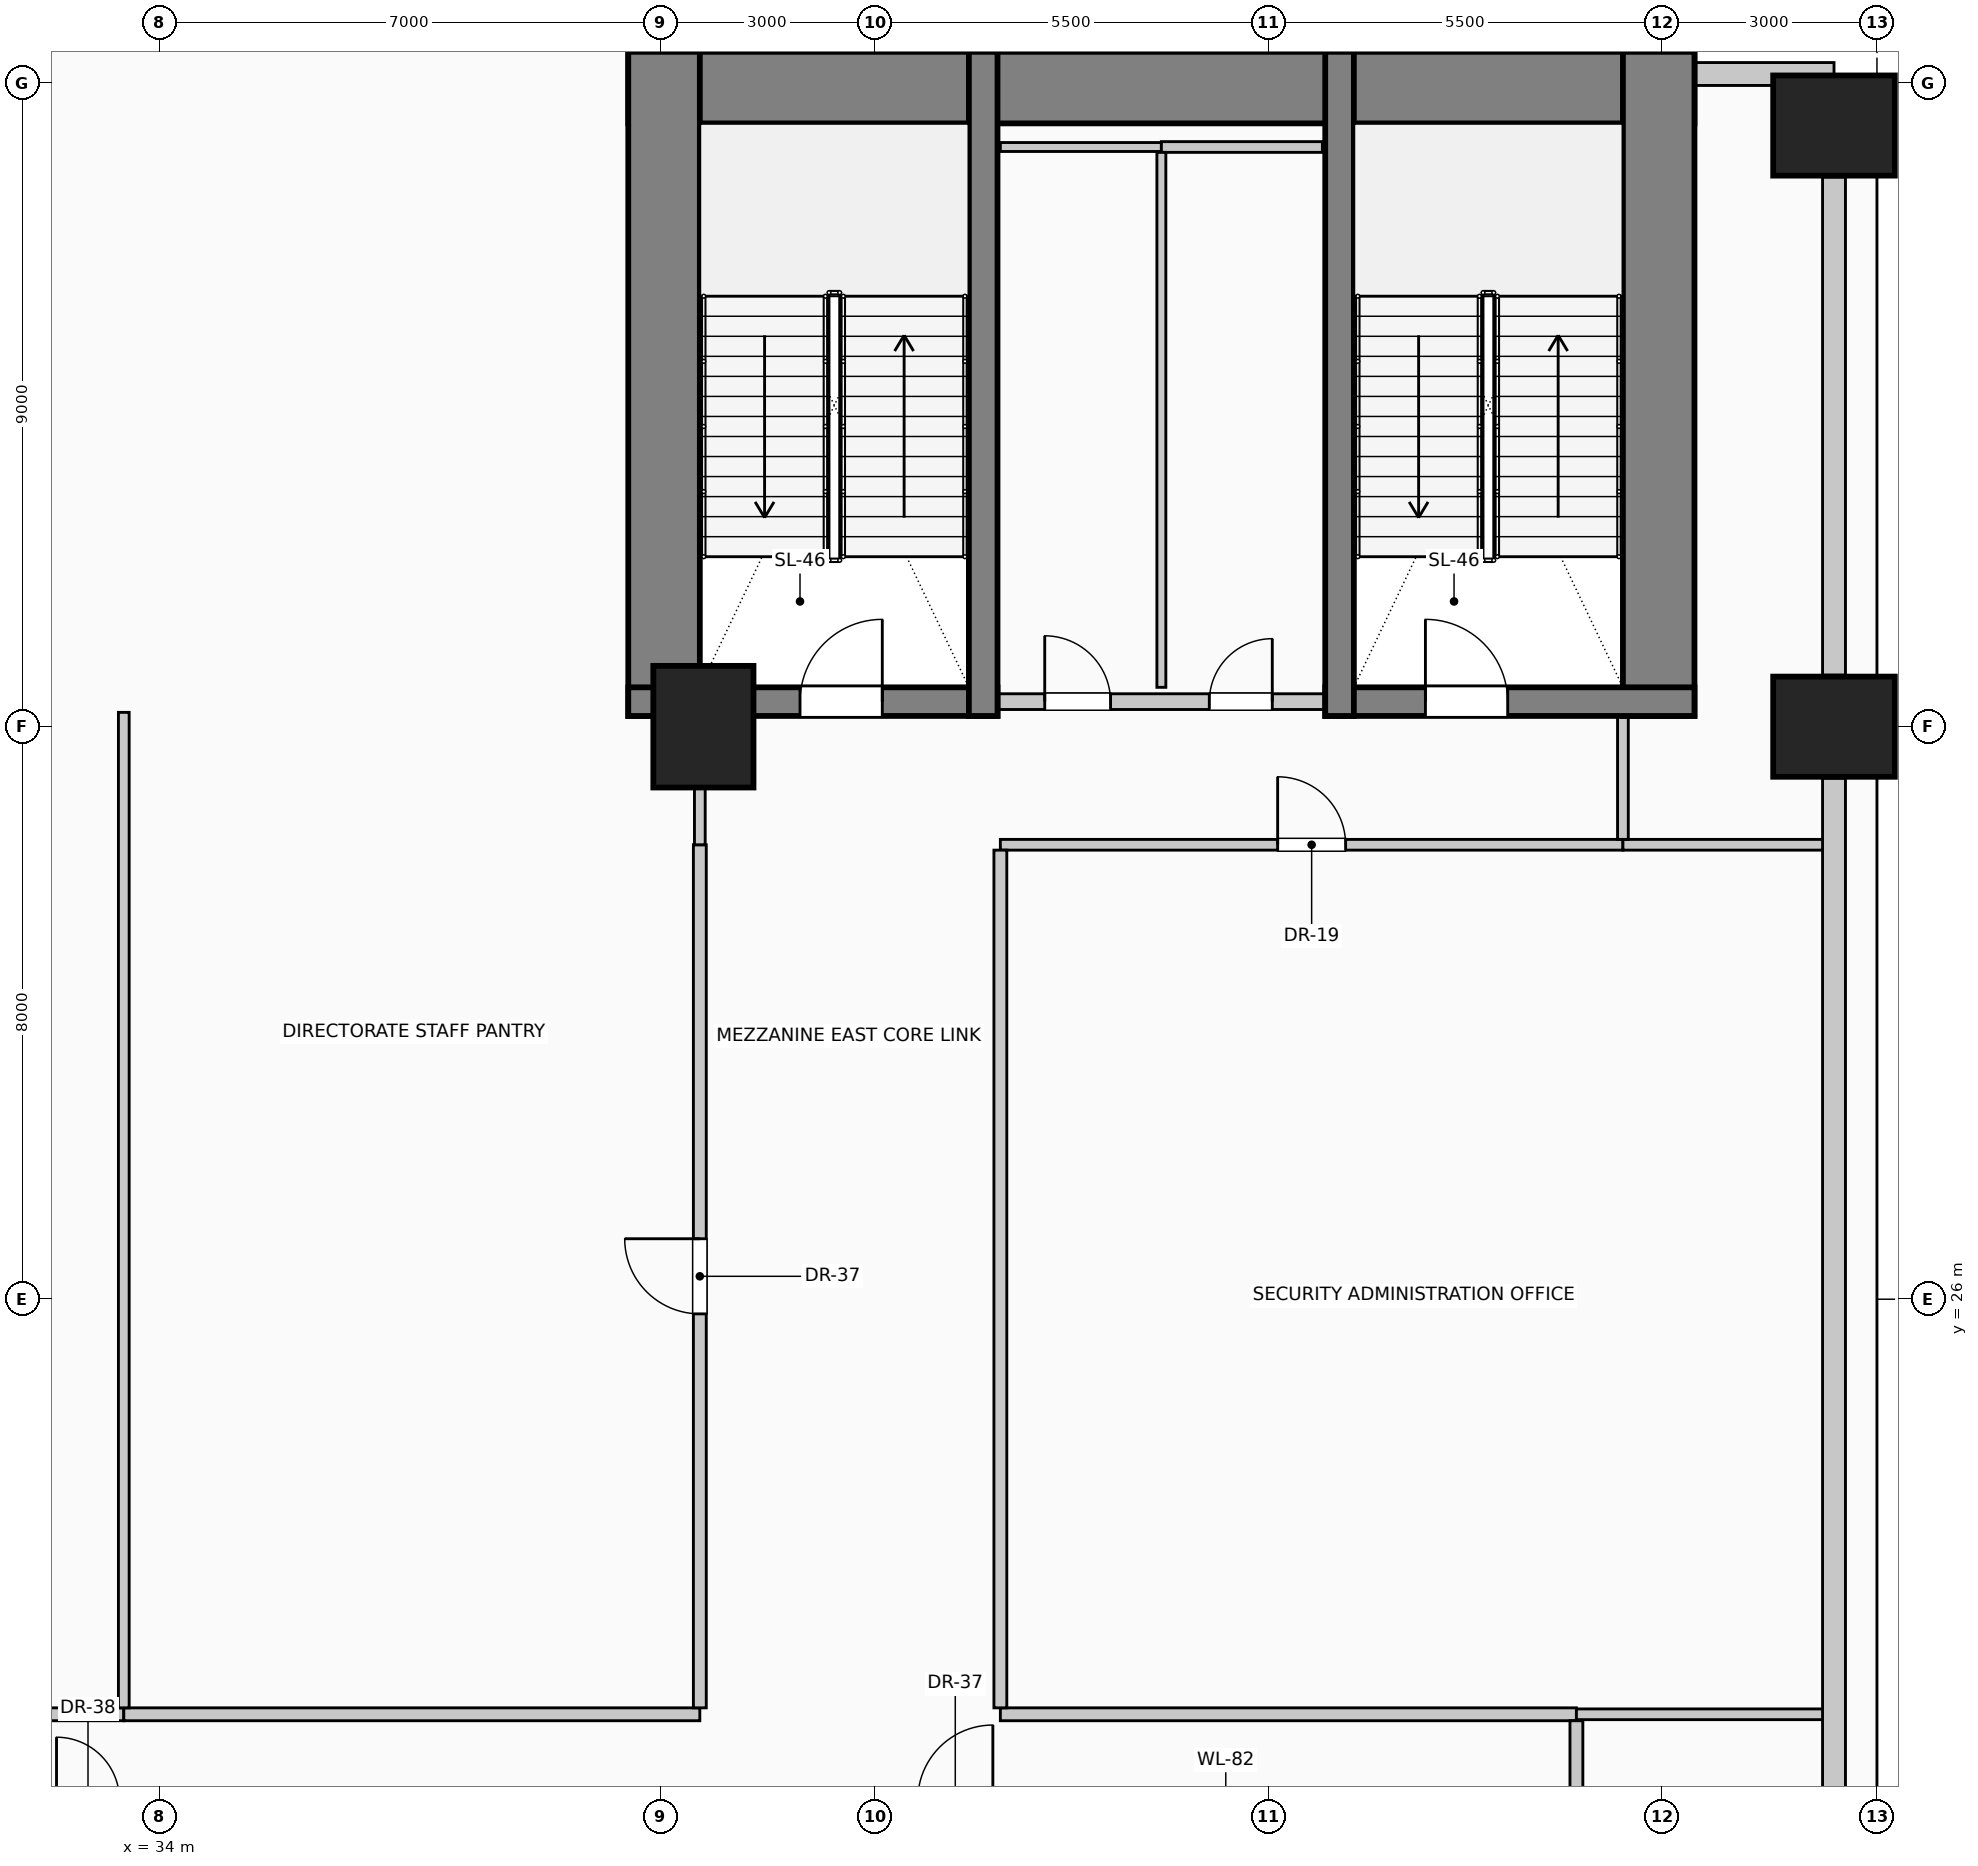
"""IFC4 building model, lengths in metres.
Left out: names, types, materials, properties, quantities, classifications, styles, units other than length and angle.
Written with IfcOpenShell. Run it as: python <this file> out.ifc"""

import sys

from ifc_helpers import new_model, si_unit, direction, frame, frame_2d, origin, origin_2d, place, context, subcontext, project, spatial, rectangle, extrude, element, fill, save


model = new_model("IFC4")
c1 = context("Model", 3, precision=1e-05, world=origin(), true_north=direction((0.0, 1.0)))
c2 = subcontext(c1, "Body", "Model", "MODEL_VIEW")
j1 = project(units=[si_unit("LENGTHUNIT", "METRE"), si_unit("PLANEANGLEUNIT", "RADIAN")], contexts=[c1])
p1 = place(None, origin())
s1 = spatial("IfcSite", under=j1, at=p1, CompositionType="ELEMENT")
p2 = place(p1, origin())
s2 = spatial("IfcBuilding", under=s1, at=p2, CompositionType="ELEMENT")
p3 = place(p2, frame((0.0, 0.0, 17.55)))
s3 = spatial("IfcBuildingStorey", under=s2, at=p3, CompositionType="ELEMENT", Elevation=17.55)
p4 = place(p3, frame((40.55, 42.93, 0.0), z_axis=(0.0, 0.0, 1.0), x_axis=(1.0, 0.0, 0.0)))
e1 = element("IfcWall", 1, at=p4, inside=s3, PredefinedType="SHEAR", context=c2, shape_type="SweptSolid", body=[
    extrude(rectangle(XDim=14.9, YDim=1.0, at=frame_2d((7.45, 0.0))), origin(), (0.0, 0.0, 1.0), 5.05),
])
for number, where, z_axis, x_axis in (
    (2, (41.05, 34.15, 0.0), (0.0, 0.0, 1.0), (0.0, 1.0, 0.0)),
    (3, (54.95, 34.15, 0.0), (0.0, 0.0, 1.0), (0.0, 1.0, 0.0)),
):
    element("IfcWall", number, at=place(p3, frame(where, z_axis=z_axis, x_axis=x_axis)), inside=s3, PredefinedType="SHEAR", context=c2, shape_type="SweptSolid", body=[
        extrude(rectangle(XDim=9.28, YDim=1.0, at=frame_2d((4.64, 0.0))), origin(), (0.0, 0.0, 1.0), 5.05),
    ])
p5 = place(p3, frame((40.55, 34.35, 0.0), z_axis=(0.0, 0.0, 1.0), x_axis=(1.0, 0.0, 0.0)))
e4 = element("IfcWall", 4, at=p5, inside=s3, PredefinedType="SHEAR", context=c2, shape_type="SweptSolid", body=[
    extrude(rectangle(XDim=5.16, YDim=0.4, at=frame_2d((2.58, 0.0))), origin(), (0.0, 0.0, 1.0), 5.05),
])
p6 = place(p5, frame((2.4, 0.0, 0.0)))
e5 = element("IfcOpeningElement", 5, at=p6, cuts=e4, PredefinedType="OPENING", context=c2, shape_type="SweptSolid", body=[
    extrude(rectangle(XDim=1.15, YDim=2.2, at=frame_2d((0.575, 1.1))), frame((0.0, 0.21, 0.0), z_axis=(0.0, -1.0, 0.0), x_axis=(1.0, 0.0, 0.0)), (0.0, 0.0, 1.0), 0.42),
])
p7 = place(p3, frame((45.51, 34.15, 0.0), z_axis=(0.0, 0.0, 1.0), x_axis=(0.0, 1.0, 0.0)))
e6 = element("IfcWall", 6, at=p7, inside=s3, PredefinedType="SHEAR", context=c2, shape_type="SweptSolid", body=[
    extrude(rectangle(XDim=9.28, YDim=0.4, at=frame_2d((4.64, 0.0))), origin(), (0.0, 0.0, 1.0), 5.05),
])
p8 = place(p3, frame((50.29, 34.35, 0.0), z_axis=(0.0, 0.0, 1.0), x_axis=(1.0, 0.0, 0.0)))
e7 = element("IfcWall", 7, at=p8, inside=s3, PredefinedType="SHEAR", context=c2, shape_type="SweptSolid", body=[
    extrude(rectangle(XDim=5.16, YDim=0.4, at=frame_2d((2.58, 0.0))), origin(), (0.0, 0.0, 1.0), 5.05),
])
p9 = place(p8, frame((1.4, 0.0, 0.0)))
e8 = element("IfcOpeningElement", 8, at=p9, cuts=e7, PredefinedType="OPENING", context=c2, shape_type="SweptSolid", body=[
    extrude(rectangle(XDim=1.15, YDim=2.2, at=frame_2d((0.575, 1.1))), frame((0.0, 0.21, 0.0), z_axis=(0.0, -1.0, 0.0), x_axis=(1.0, 0.0, 0.0)), (0.0, 0.0, 1.0), 0.42),
])
p10 = place(p3, frame((50.49, 34.15, 0.0), z_axis=(0.0, 0.0, 1.0), x_axis=(0.0, 1.0, 0.0)))
e9 = element("IfcWall", 9, at=p10, inside=s3, PredefinedType="SHEAR", context=c2, shape_type="SweptSolid", body=[
    extrude(rectangle(XDim=9.28, YDim=0.4, at=frame_2d((4.64, 0.0))), origin(), (0.0, 0.0, 1.0), 5.05),
])
for number, where, z_axis, x_axis in (
    (10, (57.4, 34.0, 0.0), (0.0, 0.0, 1.0), (0.0, 1.0, 0.0)),
    (11, (57.4, 42.4, 0.0), (0.0, 0.0, 1.0), (0.0, 1.0, 0.0)),
    (12, (41.6, 34.0, 0.0), (0.0, 0.0, 1.0), (1.0, 0.0, 0.0)),
):
    element("IfcColumn", number, at=place(p3, frame(where, z_axis=z_axis, x_axis=x_axis)), inside=s3, PredefinedType="COLUMN", context=c2, shape_type="SweptSolid", body=[
        extrude(rectangle(XDim=1.4, YDim=1.7, at=origin_2d()), origin(), (0.0, 0.0, 1.0), 5.05),
    ])
p11 = place(p3, frame((57.4, 33.28, 0.0), z_axis=(0.0, 0.0, 1.0), x_axis=(0.0, -1.0, 0.0)))
e13 = element("IfcWall", 13, at=p11, inside=s3, PredefinedType="SOLIDWALL", context=c2, shape_type="SweptSolid", body=[
    extrude(rectangle(XDim=14.56, YDim=0.32, at=frame_2d((7.28, 0.0))), origin(), (0.0, 0.0, 1.0), 3.15),
])
p12 = place(p3, frame((57.4, 41.68, 0.0), z_axis=(0.0, 0.0, 1.0), x_axis=(0.0, -1.0, 0.0)))
e14 = element("IfcWall", 14, at=p12, inside=s3, PredefinedType="SOLIDWALL", context=c2, shape_type="SweptSolid", body=[
    extrude(rectangle(XDim=6.96, YDim=0.32, at=frame_2d((3.48, 0.0))), origin(), (0.0, 0.0, 1.0), 3.15),
])
p13 = place(p3, frame((55.455, 43.12, 0.0), z_axis=(0.0, 0.0, 1.0), x_axis=(1.0, 0.0, 0.0)))
e15 = element("IfcWall", 15, at=p13, inside=s3, PredefinedType="SOLIDWALL", context=c2, shape_type="SweptSolid", body=[
    extrude(rectangle(XDim=1.945, YDim=0.32, at=frame_2d((0.972, 0.0))), origin(), (0.0, 0.0, 1.0), 4.75),
])
p14 = place(p3, frame((45.72, 34.35, 0.0), z_axis=(0.0, 0.0, 1.0), x_axis=(1.0, 0.0, 0.0)))
e16 = element("IfcWall", 16, at=p14, inside=s3, PredefinedType="PARTITIONING", context=c2, shape_type="SweptSolid", body=[
    extrude(rectangle(XDim=4.56, YDim=0.22, at=frame_2d((2.28, 0.0))), origin(), (0.0, 0.0, 1.0), 3.145),
])
p15 = place(p14, frame((0.65, 0.0, 0.0)))
e17 = element("IfcOpeningElement", 17, at=p15, cuts=e16, PredefinedType="OPENING", context=c2, shape_type="SweptSolid", body=[
    extrude(rectangle(XDim=0.92, YDim=2.1, at=frame_2d((0.46, 1.05))), frame((0.0, 0.12, 0.0), z_axis=(0.0, -1.0, 0.0), x_axis=(1.0, 0.0, 0.0)), (0.0, 0.0, 1.0), 0.24),
])
p16 = place(p14, frame((2.95, 0.0, 0.0)))
e18 = element("IfcOpeningElement", 18, at=p16, cuts=e16, PredefinedType="OPENING", context=c2, shape_type="SweptSolid", body=[
    extrude(rectangle(XDim=0.88, YDim=2.1, at=frame_2d((0.44, 1.05))), frame((0.0, 0.12, 0.0), z_axis=(0.0, -1.0, 0.0), x_axis=(1.0, 0.0, 0.0)), (0.0, 0.0, 1.0), 0.24),
])
p17 = place(p3, frame((15.85, 20.2, 0.0), z_axis=(0.0, 0.0, 1.0), x_axis=(1.0, 0.0, 0.0)))
e19 = element("IfcWall", 19, at=p17, inside=s3, PredefinedType="PARTITIONING", context=c2, shape_type="SweptSolid", body=[
    extrude(rectangle(XDim=17.65, YDim=0.18, at=frame_2d((8.825, 0.0))), origin(), (0.0, 0.0, 1.0), 4.75),
])
for number, where, z_axis, x_axis in (
    (20, (33.5, 20.2, 0.0), (0.0, 0.0, 1.0), (1.0, 0.0, 0.0)),
    (21, (45.75, 20.2, 0.0), (0.0, 0.0, 1.0), (1.0, 0.0, 0.0)),
):
    element("IfcWall", number, at=place(p3, frame(where, z_axis=z_axis, x_axis=x_axis)), inside=s3, PredefinedType="PARTITIONING", context=c2, shape_type="SweptSolid", body=[
        extrude(rectangle(XDim=8.05, YDim=0.18, at=frame_2d((4.025, 0.0))), origin(), (0.0, 0.0, 1.0), 4.75),
    ])
p18 = place(p3, frame((53.8, 20.2, 0.0), z_axis=(0.0, 0.0, 1.0), x_axis=(1.0, 0.0, 0.0)))
e22 = element("IfcWall", 22, at=p18, inside=s3, PredefinedType="PARTITIONING", context=c2, shape_type="SweptSolid", body=[
    extrude(rectangle(XDim=3.44, YDim=0.15, at=frame_2d((1.72, 0.0))), origin(), (0.0, 0.0, 1.0), 4.75),
])
p19 = place(p3, frame((45.75, 32.35, 0.0), z_axis=(0.0, 0.0, 1.0), x_axis=(1.0, 0.0, 0.0)))
e23 = element("IfcWall", 23, at=p19, inside=s3, PredefinedType="PARTITIONING", context=c2, shape_type="SweptSolid", body=[
    extrude(rectangle(XDim=8.7, YDim=0.15, at=frame_2d((4.35, 0.0))), origin(), (0.0, 0.0, 1.0), 4.75),
])
p20 = place(p19, frame((3.875, 0.0, 0.0)))
e24 = element("IfcOpeningElement", 24, at=p20, cuts=e23, PredefinedType="OPENING", context=c2, shape_type="SweptSolid", body=[
    extrude(rectangle(XDim=0.95, YDim=2.15, at=frame_2d((0.475, 1.075))), frame((0.0, 0.085, 0.0), z_axis=(0.0, -1.0, 0.0), x_axis=(1.0, 0.0, 0.0)), (0.0, 0.0, 1.0), 0.17),
])
p21 = place(p3, frame((54.45, 32.35, 0.0), z_axis=(0.0, 0.0, 1.0), x_axis=(1.0, 0.0, 0.0)))
e25 = element("IfcWall", 25, at=p21, inside=s3, PredefinedType="PARTITIONING", context=c2, shape_type="SweptSolid", body=[
    extrude(rectangle(XDim=2.79, YDim=0.15, at=frame_2d((1.395, 0.0))), origin(), (0.0, 0.0, 1.0), 4.75),
])
p22 = place(p3, frame((45.75, 42.1, 0.0), z_axis=(0.0, 0.0, 1.0), x_axis=(1.0, 0.0, 0.0)))
e26 = element("IfcWall", 26, at=p22, inside=s3, PredefinedType="PARTITIONING", context=c2, shape_type="SweptSolid", body=[
    extrude(rectangle(XDim=2.25, YDim=0.125, at=frame_2d((1.125, 0.0))), origin(), (0.0, 0.0, 1.0), 4.75),
])
p23 = place(p3, frame((48.0, 42.1, 0.0), z_axis=(0.0, 0.0, 1.0), x_axis=(1.0, 0.0, 0.0)))
e27 = element("IfcWall", 27, at=p23, inside=s3, PredefinedType="PARTITIONING", context=c2, shape_type="SweptSolid", body=[
    extrude(rectangle(XDim=2.25, YDim=0.15, at=frame_2d((1.125, 0.0))), origin(), (0.0, 0.0, 1.0), 4.75),
])
p24 = place(p3, frame((33.5, 20.29, 0.0), z_axis=(0.0, 0.0, 1.0), x_axis=(0.0, 1.0, 0.0)))
e28 = element("IfcWall", 28, at=p24, inside=s3, PredefinedType="PARTITIONING", context=c2, shape_type="SweptSolid", body=[
    extrude(rectangle(XDim=13.91, YDim=0.15, at=frame_2d((6.955, 0.0))), origin(), (0.0, 0.0, 1.0), 4.75),
])
p25 = place(p3, frame((41.55, 20.29, 0.0), z_axis=(0.0, 0.0, 1.0), x_axis=(0.0, 1.0, 0.0)))
e29 = element("IfcWall", 29, at=p25, inside=s3, PredefinedType="PARTITIONING", context=c2, shape_type="SweptSolid", body=[
    extrude(rectangle(XDim=12.06, YDim=0.18, at=frame_2d((6.03, 0.0))), origin(), (0.0, 0.0, 1.0), 3.145),
])
p26 = place(p25, frame((5.505, 0.0, 0.0)))
e30 = element("IfcOpeningElement", 30, at=p26, cuts=e29, PredefinedType="OPENING", context=c2, shape_type="SweptSolid", body=[
    extrude(rectangle(XDim=1.05, YDim=2.15, at=frame_2d((0.525, 1.075))), frame((0.0, 0.1, 0.0), z_axis=(0.0, -1.0, 0.0), x_axis=(1.0, 0.0, 0.0)), (0.0, 0.0, 1.0), 0.2),
])
p27 = place(p3, frame((41.55, 32.35, 0.0), z_axis=(0.0, 0.0, 1.0), x_axis=(0.0, 1.0, 0.0)))
e31 = element("IfcWall", 31, at=p27, inside=s3, PredefinedType="PARTITIONING", context=c2, shape_type="SweptSolid", body=[
    extrude(rectangle(XDim=0.8, YDim=0.15, at=frame_2d((0.4, 0.0))), origin(), (0.0, 0.0, 1.0), 3.145),
])
p28 = place(p3, frame((45.75, 20.29, 0.0), z_axis=(0.0, 0.0, 1.0), x_axis=(0.0, 1.0, 0.0)))
e32 = element("IfcWall", 32, at=p28, inside=s3, PredefinedType="PARTITIONING", context=c2, shape_type="SweptSolid", body=[
    extrude(rectangle(XDim=11.985, YDim=0.18, at=frame_2d((5.992, 0.0))), origin(), (0.0, 0.0, 1.0), 4.75),
])
p29 = place(p3, frame((48.0, 34.55, 0.0), z_axis=(0.0, 0.0, 1.0), x_axis=(0.0, 1.0, 0.0)))
e33 = element("IfcWall", 33, at=p29, inside=s3, PredefinedType="PARTITIONING", context=c2, shape_type="SweptSolid", body=[
    extrude(rectangle(XDim=7.475, YDim=0.125, at=frame_2d((3.737, 0.0))), origin(), (0.0, 0.0, 1.0), 4.75),
])
p30 = place(p3, frame((53.8, 19.09, 0.0), z_axis=(0.0, 0.0, 1.0), x_axis=(0.0, 1.0, 0.0)))
e34 = element("IfcWall", 34, at=p30, inside=s3, PredefinedType="PARTITIONING", context=c2, shape_type="SweptSolid", body=[
    extrude(rectangle(XDim=1.02, YDim=0.18, at=frame_2d((0.51, 0.0))), origin(), (0.0, 0.0, 1.0), 4.75),
])
p31 = place(p3, frame((54.45, 32.425, 0.0), z_axis=(0.0, 0.0, 1.0), x_axis=(0.0, 1.0, 0.0)))
e35 = element("IfcWall", 35, at=p31, inside=s3, PredefinedType="PARTITIONING", context=c2, shape_type="SweptSolid", body=[
    extrude(rectangle(XDim=1.725, YDim=0.15, at=frame_2d((0.862, 0.0))), origin(), (0.0, 0.0, 1.0), 4.75),
])
p32 = place(p6, origin())
e36 = element("IfcDoor", 36, at=p32, inside=s3, OperationType="SINGLE_SWING_RIGHT", PredefinedType="DOOR", context=c2, shape_type="SweptSolid", body=[
    extrude(rectangle(XDim=1.15, YDim=2.2, at=frame_2d((0.575, 1.1))), frame((0.0, 0.025, 0.0), z_axis=(0.0, -1.0, 0.0), x_axis=(1.0, 0.0, 0.0)), (0.0, 0.0, 1.0), 0.05),
])
fill(e5, e36)
p33 = place(p15, origin())
e37 = element("IfcDoor", 37, at=p33, inside=s3, OperationType="SINGLE_SWING_LEFT", PredefinedType="DOOR", context=c2, shape_type="SweptSolid", body=[
    extrude(rectangle(XDim=0.92, YDim=2.1, at=frame_2d((0.46, 1.05))), frame((0.0, 0.025, 0.0), z_axis=(0.0, -1.0, 0.0), x_axis=(1.0, 0.0, 0.0)), (0.0, 0.0, 1.0), 0.05),
])
fill(e17, e37)
p34 = place(p16, origin())
e38 = element("IfcDoor", 38, at=p34, inside=s3, OperationType="SINGLE_SWING_RIGHT", PredefinedType="DOOR", context=c2, shape_type="SweptSolid", body=[
    extrude(rectangle(XDim=0.88, YDim=2.1, at=frame_2d((0.44, 1.05))), frame((0.0, 0.025, 0.0), z_axis=(0.0, -1.0, 0.0), x_axis=(1.0, 0.0, 0.0)), (0.0, 0.0, 1.0), 0.05),
])
fill(e18, e38)
p35 = place(p9, origin())
e39 = element("IfcDoor", 39, at=p35, inside=s3, OperationType="SINGLE_SWING_LEFT", PredefinedType="DOOR", context=c2, shape_type="SweptSolid", body=[
    extrude(rectangle(XDim=1.15, YDim=2.2, at=frame_2d((0.575, 1.1))), frame((0.0, 0.025, 0.0), z_axis=(0.0, -1.0, 0.0), x_axis=(1.0, 0.0, 0.0)), (0.0, 0.0, 1.0), 0.05),
])
fill(e8, e39)
p36 = place(p20, origin())
e40 = element("IfcDoor", 40, at=p36, inside=s3, OperationType="SINGLE_SWING_LEFT", PredefinedType="DOOR", context=c2, shape_type="SweptSolid", body=[
    extrude(rectangle(XDim=0.95, YDim=2.15, at=frame_2d((0.475, 1.075))), frame((0.0, 0.025, 0.0), z_axis=(0.0, -1.0, 0.0), x_axis=(1.0, 0.0, 0.0)), (0.0, 0.0, 1.0), 0.05),
])
fill(e24, e40)
p37 = place(p26, origin())
e41 = element("IfcDoor", 41, at=p37, inside=s3, OperationType="SINGLE_SWING_RIGHT", PredefinedType="DOOR", context=c2, shape_type="SweptSolid", body=[
    extrude(rectangle(XDim=1.05, YDim=2.15, at=frame_2d((0.525, 1.075))), frame((0.0, 0.025, 0.0), z_axis=(0.0, -1.0, 0.0), x_axis=(1.0, 0.0, 0.0)), (0.0, 0.0, 1.0), 0.05),
])
fill(e30, e41)
save(model, sys.argv[1])
